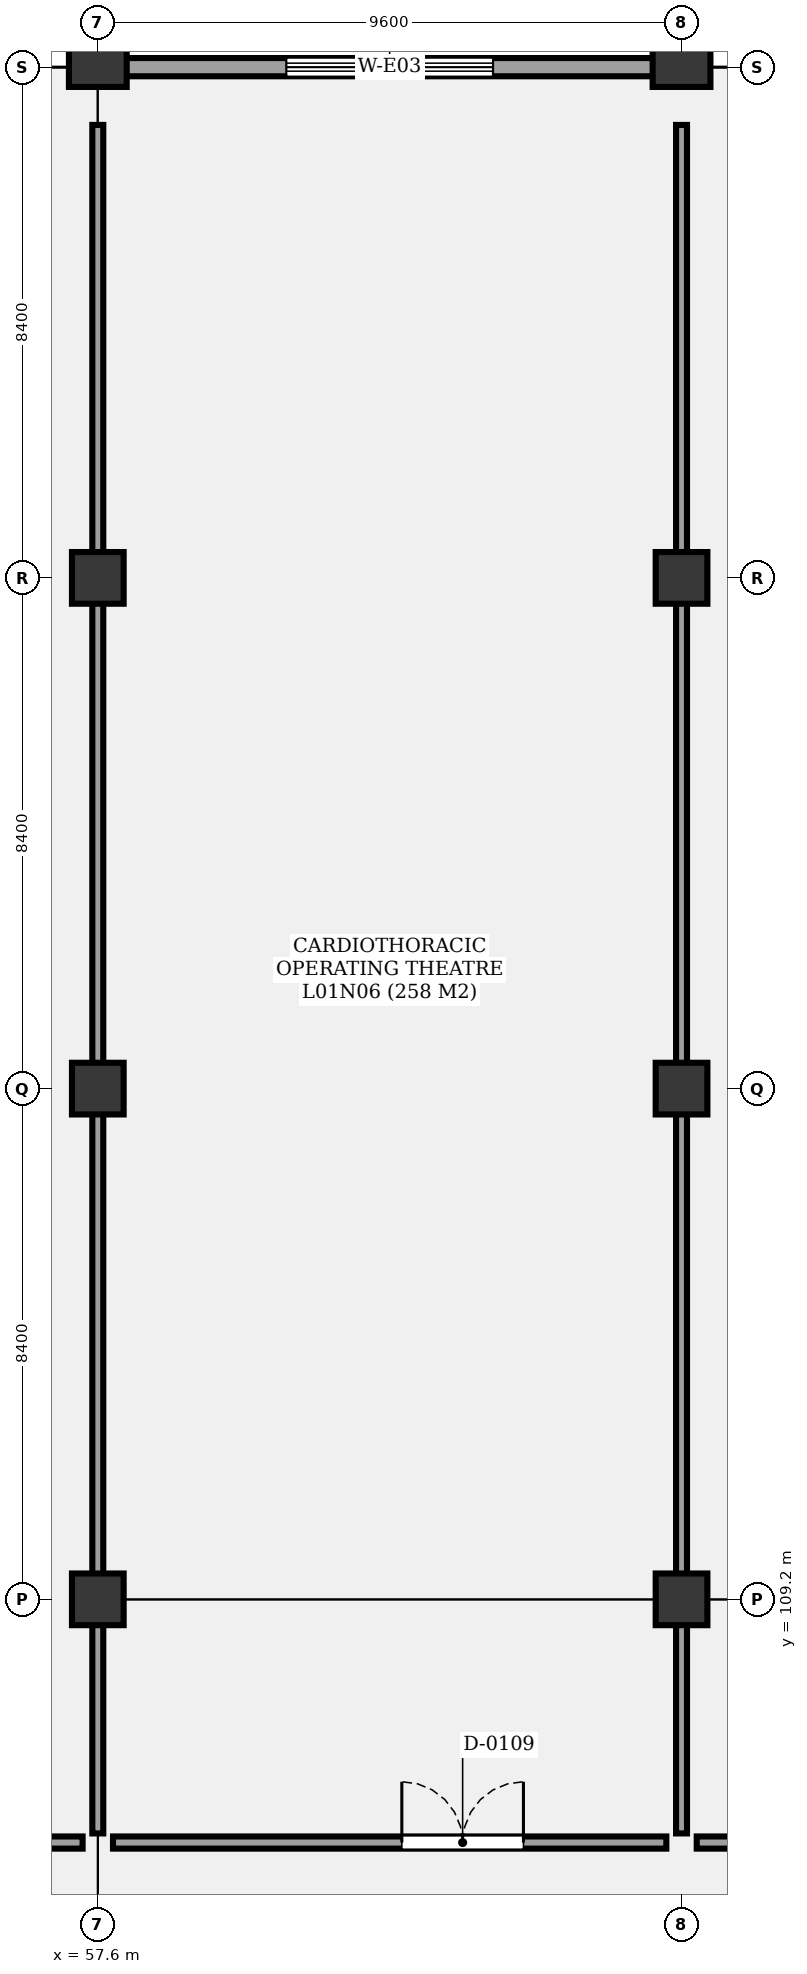
"""IFC4 building model, lengths in metres.
Left out: names, types, materials, properties, quantities, classifications, styles, units other than length and angle.
Written with IfcOpenShell. Run it as: python <this file> out.ifc"""

import sys

from ifc_helpers import new_model, si_unit, direction, frame, frame_2d, origin, origin_2d, place, context, subcontext, project, spatial, rectangle, extrude, element, fill, save


model = new_model("IFC4")
c1 = context("Model", 3, precision=1e-05, world=origin(), true_north=direction((0.0, 1.0)))
c2 = subcontext(c1, "Body", "Model", "MODEL_VIEW")
j1 = project(units=[si_unit("LENGTHUNIT", "METRE"), si_unit("PLANEANGLEUNIT", "RADIAN")], contexts=[c1])
p1 = place(None, origin())
s1 = spatial("IfcSite", under=j1, at=p1, CompositionType="ELEMENT")
p2 = place(p1, origin())
s2 = spatial("IfcBuilding", under=s1, at=p2, CompositionType="ELEMENT")
p3 = place(p2, frame((0.0, 0.0, 5.1)))
s3 = spatial("IfcBuildingStorey", under=s2, at=p3, CompositionType="ELEMENT", Elevation=5.1)
for number, where, z_axis, x_axis in (
    (1, (57.6, 109.2, 0.0), (0.0, 0.0, 1.0), (1.0, 0.0, 0.0)),
    (2, (57.6, 117.6, 0.0), (0.0, 0.0, 1.0), (1.0, 0.0, 0.0)),
    (3, (57.6, 126.0, 0.0), (0.0, 0.0, 1.0), (1.0, 0.0, 0.0)),
):
    element("IfcColumn", number, at=place(p3, frame(where, z_axis=z_axis, x_axis=x_axis)), inside=s3, PredefinedType="COLUMN", context=c2, shape_type="SweptSolid", body=[
        extrude(rectangle(XDim=0.85, YDim=0.85, at=origin_2d()), origin(), (0.0, 0.0, 1.0), 4.8),
    ])
p4 = place(p3, frame((57.6, 134.4, 0.0), z_axis=(0.0, 0.0, 1.0), x_axis=(0.0, 1.0, 0.0)))
e4 = element("IfcColumn", 4, at=p4, inside=s3, PredefinedType="COLUMN", context=c2, shape_type="SweptSolid", body=[
    extrude(rectangle(XDim=0.95, YDim=0.65, at=origin_2d()), origin(), (0.0, 0.0, 1.0), 4.8),
])
for number, where, z_axis, x_axis in (
    (5, (67.2, 109.2, 0.0), (0.0, 0.0, 1.0), (1.0, 0.0, 0.0)),
    (6, (67.2, 117.6, 0.0), (0.0, 0.0, 1.0), (1.0, 0.0, 0.0)),
    (7, (67.2, 126.0, 0.0), (0.0, 0.0, 1.0), (1.0, 0.0, 0.0)),
):
    element("IfcColumn", number, at=place(p3, frame(where, z_axis=z_axis, x_axis=x_axis)), inside=s3, PredefinedType="COLUMN", context=c2, shape_type="SweptSolid", body=[
        extrude(rectangle(XDim=0.85, YDim=0.85, at=origin_2d()), origin(), (0.0, 0.0, 1.0), 4.8),
    ])
p5 = place(p3, frame((67.2, 134.4, 0.0), z_axis=(0.0, 0.0, 1.0), x_axis=(0.0, 1.0, 0.0)))
e8 = element("IfcColumn", 8, at=p5, inside=s3, PredefinedType="COLUMN", context=c2, shape_type="SweptSolid", body=[
    extrude(rectangle(XDim=0.95, YDim=0.65, at=origin_2d()), origin(), (0.0, 0.0, 1.0), 4.8),
])
p6 = place(p3, frame((57.6, 134.4, 0.0), z_axis=(0.0, 0.0, 1.0), x_axis=(1.0, 0.0, 0.0)))
e9 = element("IfcWall", 9, at=p6, inside=s3, PredefinedType="SOLIDWALL", context=c2, shape_type="SweptSolid", body=[
    extrude(rectangle(XDim=9.6, YDim=0.3, at=frame_2d((4.8, 0.0))), origin(), (0.0, 0.0, 1.0), 3.94),
])
p7 = place(p6, frame((3.1, 0.0, 0.85)))
e10 = element("IfcOpeningElement", 10, at=p7, cuts=e9, PredefinedType="OPENING", context=c2, shape_type="SweptSolid", body=[
    extrude(rectangle(XDim=3.4, YDim=1.2, at=frame_2d((1.7, 0.6))), frame((0.0, 0.16, 0.0), z_axis=(0.0, -1.0, 0.0), x_axis=(1.0, 0.0, 0.0)), (0.0, 0.0, 1.0), 0.32),
])
p8 = place(p3, frame((48.25, 105.2, 0.0), z_axis=(0.0, 0.0, 1.0), x_axis=(1.0, 0.0, 0.0)))
e11 = element("IfcWall", 11, at=p8, inside=s3, PredefinedType="PARTITIONING", context=c2, shape_type="SweptSolid", body=[
    extrude(rectangle(XDim=9.1, YDim=0.2, at=frame_2d((4.55, 0.0))), origin(), (0.0, 0.0, 1.0), 3.68),
])
p9 = place(p8, frame((4.75, 0.0, 0.0)))
e12 = element("IfcOpeningElement", 12, at=p9, cuts=e11, PredefinedType="OPENING", context=c2, shape_type="SweptSolid", body=[
    extrude(rectangle(XDim=0.95, YDim=2.1, at=frame_2d((0.475, 1.05))), frame((0.0, 0.11, 0.0), z_axis=(0.0, -1.0, 0.0), x_axis=(1.0, 0.0, 0.0)), (0.0, 0.0, 1.0), 0.22),
])
p10 = place(p3, frame((57.85, 105.2, 0.0), z_axis=(0.0, 0.0, 1.0), x_axis=(1.0, 0.0, 0.0)))
e13 = element("IfcWall", 13, at=p10, inside=s3, PredefinedType="PARTITIONING", context=c2, shape_type="SweptSolid", body=[
    extrude(rectangle(XDim=9.1, YDim=0.2, at=frame_2d((4.55, 0.0))), origin(), (0.0, 0.0, 1.0), 3.68),
])
p11 = place(p10, frame((4.75, 0.0, 0.0)))
e14 = element("IfcOpeningElement", 14, at=p11, cuts=e13, PredefinedType="OPENING", context=c2, shape_type="SweptSolid", body=[
    extrude(rectangle(XDim=2.0, YDim=2.4, at=frame_2d((1.0, 1.2))), frame((0.0, 0.11, 0.0), z_axis=(0.0, -1.0, 0.0), x_axis=(1.0, 0.0, 0.0)), (0.0, 0.0, 1.0), 0.22),
])
p12 = place(p3, frame((57.6, 105.35, 0.0), z_axis=(0.0, 0.0, 1.0), x_axis=(0.0, 1.0, 0.0)))
e15 = element("IfcWall", 15, at=p12, inside=s3, PredefinedType="PARTITIONING", context=c2, shape_type="SweptSolid", body=[
    extrude(rectangle(XDim=28.1, YDim=0.18, at=frame_2d((14.05, 0.0))), origin(), (0.0, 0.0, 1.0), 3.68),
])
p13 = place(p3, frame((67.45, 105.2, 0.0), z_axis=(0.0, 0.0, 1.0), x_axis=(1.0, 0.0, 0.0)))
e16 = element("IfcWall", 16, at=p13, inside=s3, PredefinedType="PARTITIONING", context=c2, shape_type="SweptSolid", body=[
    extrude(rectangle(XDim=9.1, YDim=0.2, at=frame_2d((4.55, 0.0))), origin(), (0.0, 0.0, 1.0), 3.68),
])
p14 = place(p13, frame((4.75, 0.0, 0.0)))
e17 = element("IfcOpeningElement", 17, at=p14, cuts=e16, PredefinedType="OPENING", context=c2, shape_type="SweptSolid", body=[
    extrude(rectangle(XDim=1.8, YDim=2.4, at=frame_2d((0.9, 1.2))), frame((0.0, 0.11, 0.0), z_axis=(0.0, -1.0, 0.0), x_axis=(1.0, 0.0, 0.0)), (0.0, 0.0, 1.0), 0.22),
])
p15 = place(p3, frame((67.2, 105.35, 0.0), z_axis=(0.0, 0.0, 1.0), x_axis=(0.0, 1.0, 0.0)))
e18 = element("IfcWall", 18, at=p15, inside=s3, PredefinedType="PARTITIONING", context=c2, shape_type="SweptSolid", body=[
    extrude(rectangle(XDim=28.1, YDim=0.18, at=frame_2d((14.05, 0.0))), origin(), (0.0, 0.0, 1.0), 3.68),
])
p16 = place(p7, origin())
e19 = element("IfcWindow", 19, at=p16, inside=s3, PartitioningType="SINGLE_PANEL", PredefinedType="WINDOW", context=c2, shape_type="SweptSolid", body=[
    extrude(rectangle(XDim=3.4, YDim=1.2, at=frame_2d((1.7, 0.6))), frame((0.0, 0.03, 0.0), z_axis=(0.0, -1.0, 0.0), x_axis=(1.0, 0.0, 0.0)), (0.0, 0.0, 1.0), 0.06),
])
fill(e10, e19)
p17 = place(p11, origin())
e20 = element("IfcDoor", 20, at=p17, inside=s3, OperationType="DOUBLE_DOOR_SINGLE_SWING", PredefinedType="DOOR", context=c2, shape_type="SweptSolid", body=[
    extrude(rectangle(XDim=2.0, YDim=2.4, at=frame_2d((1.0, 1.2))), frame((0.0, 0.025, 0.0), z_axis=(0.0, -1.0, 0.0), x_axis=(1.0, 0.0, 0.0)), (0.0, 0.0, 1.0), 0.05),
])
fill(e14, e20)
save(model, sys.argv[1])
